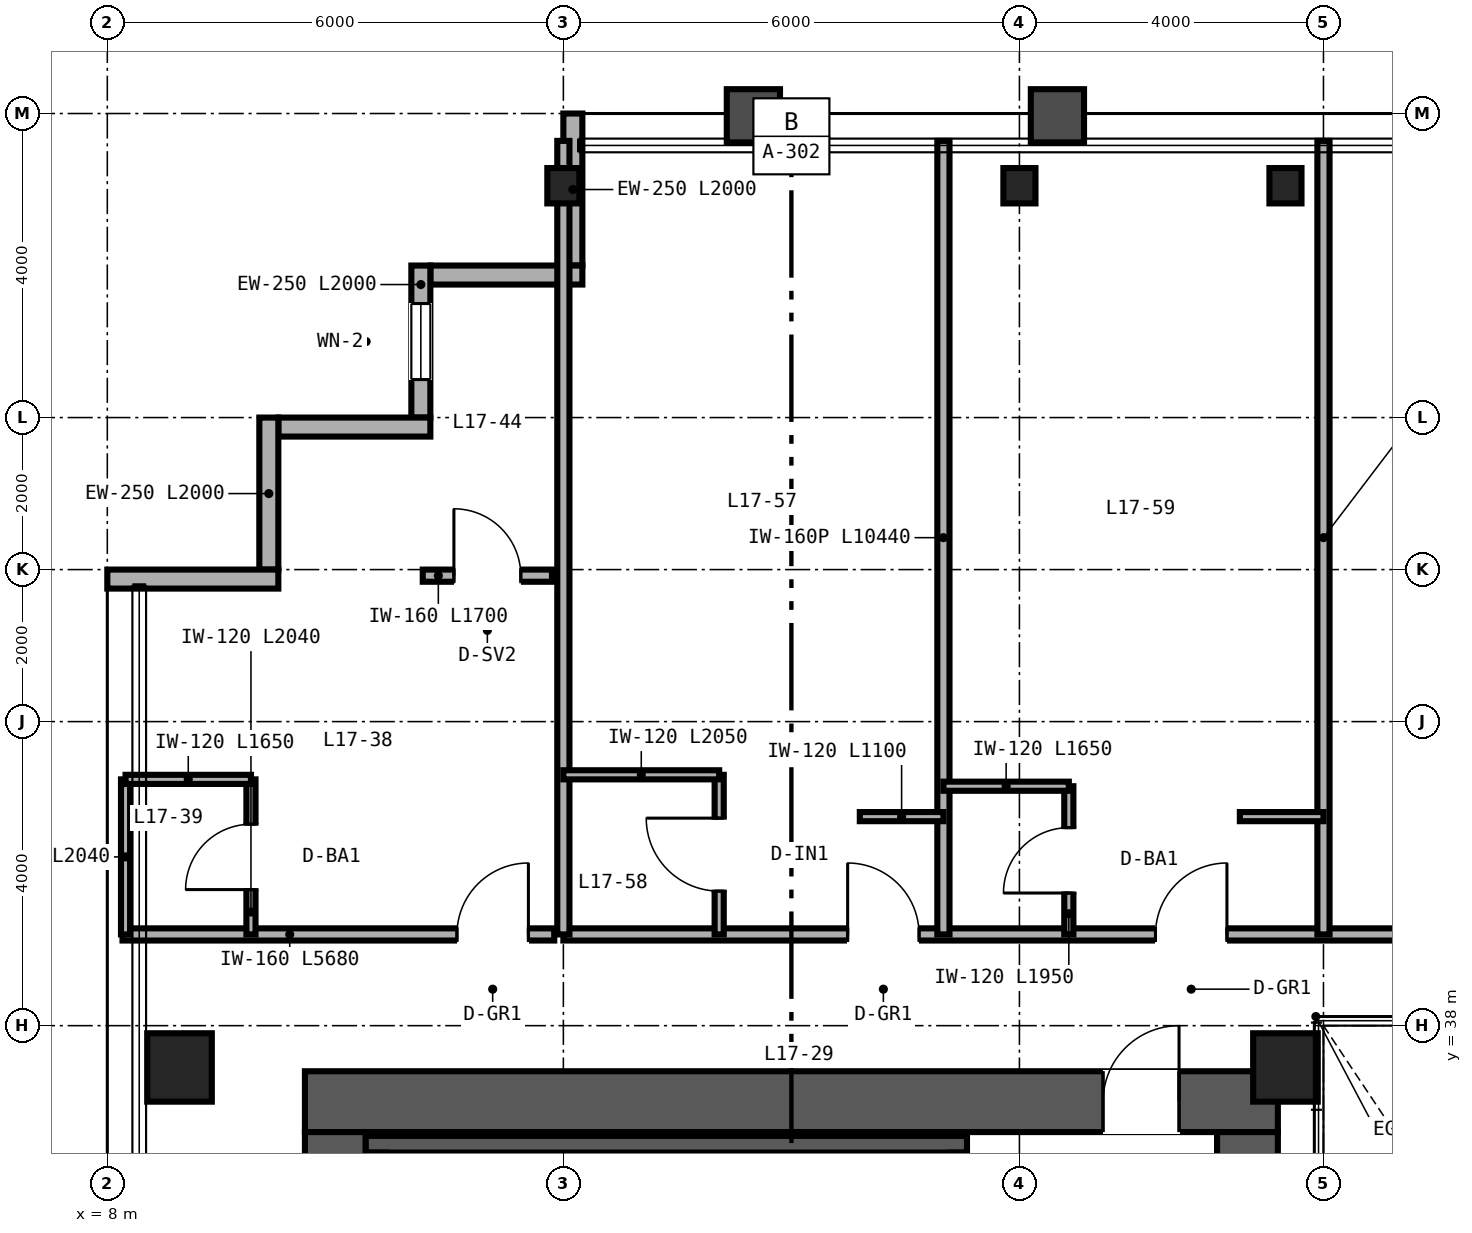
"""IFC4 building model, lengths in metres.
Left out: names, types, materials, properties, quantities, classifications, styles, units other than length and angle.
Written with IfcOpenShell. Run it as: python <this file> out.ifc"""

import sys

from ifc_helpers import new_model, si_unit, direction, frame, frame_2d, origin, origin_2d, place, context, subcontext, project, spatial, rectangle, hollow_rectangle, i_section, extrude, source, transform, mapped, element, fill, save


model = new_model("IFC4")
c1 = context("Model", 3, precision=1e-05, world=origin(), true_north=direction((0.0, 1.0)))
c2 = subcontext(c1, "Body", "Model", "MODEL_VIEW")
j1 = project(units=[si_unit("LENGTHUNIT", "METRE"), si_unit("PLANEANGLEUNIT", "RADIAN")], contexts=[c1])
p1 = place(None, origin())
s1 = spatial("IfcSite", under=j1, at=p1, CompositionType="ELEMENT")
p2 = place(p1, origin())
s2 = spatial("IfcBuilding", under=s1, at=p2, CompositionType="ELEMENT")
p3 = place(p2, frame((0.0, 0.0, 70.8)))
s3 = spatial("IfcBuildingStorey", under=s2, at=p3, CompositionType="ELEMENT", Elevation=70.8)
p4 = place(p3, frame((10.6, 37.0, 0.0), z_axis=(0.0, 0.0, 1.0), x_axis=(1.0, 0.0, 0.0)))
e1 = element("IfcWall", 1, at=p4, inside=s3, PredefinedType="SHEAR", context=c2, shape_type="SweptSolid", body=[
    extrude(rectangle(XDim=12.8, YDim=0.8, at=frame_2d((6.4, 0.0))), origin(), (0.0, 0.0, 1.0), 3.35),
])
p5 = place(p4, frame((10.5, 0.0, 0.0)))
e2 = element("IfcOpeningElement", 2, at=p5, cuts=e1, PredefinedType="OPENING", context=c2, shape_type="SweptSolid", body=[
    extrude(rectangle(XDim=1.0, YDim=2.15, at=frame_2d((0.5, 1.075))), frame((0.0, 0.41, 0.0), z_axis=(0.0, -1.0, 0.0), x_axis=(1.0, 0.0, 0.0)), (0.0, 0.0, 1.0), 0.82),
])
for number, where, z_axis, x_axis in (
    (3, (11.0, 15.4, 0.0), (0.0, 0.0, 1.0), (0.0, 1.0, 0.0)),
    (4, (23.0, 15.4, 0.0), (0.0, 0.0, 1.0), (0.0, 1.0, 0.0)),
):
    element("IfcWall", number, at=place(p3, frame(where, z_axis=z_axis, x_axis=x_axis)), inside=s3, PredefinedType="SHEAR", context=c2, shape_type="SweptSolid", body=[
        extrude(rectangle(XDim=21.2, YDim=0.8, at=frame_2d((10.6, 0.0))), origin(), (0.0, 0.0, 1.0), 3.35),
    ])
p6 = place(p3, frame((11.4, 36.44, 0.0), z_axis=(0.0, 0.0, 1.0), x_axis=(1.0, 0.0, 0.0)))
e5 = element("IfcWall", 5, at=p6, inside=s3, PredefinedType="SHEAR", context=c2, shape_type="SweptSolid", body=[
    extrude(rectangle(XDim=7.91, YDim=0.22, at=frame_2d((3.955, 0.0))), origin(), (0.0, 0.0, 1.0), 3.4),
])
for number, where, z_axis, x_axis in (
    (6, (11.56, 33.05, 0.0), (0.0, 0.0, 1.0), (0.0, 1.0, 0.0)),
    (7, (19.2, 33.05, 0.0), (0.0, 0.0, 1.0), (0.0, 1.0, 0.0)),
):
    element("IfcWall", number, at=place(p3, frame(where, z_axis=z_axis, x_axis=x_axis)), inside=s3, PredefinedType="SHEAR", context=c2, shape_type="SweptSolid", body=[
        extrude(rectangle(XDim=3.28, YDim=0.22, at=frame_2d((1.64, 0.0))), origin(), (0.0, 0.0, 1.0), 3.4),
    ])
m1 = source(origin(), c2, "Body", "SweptSolid", [
    extrude(hollow_rectangle(XDim=0.85, YDim=0.9, WallThickness=0.04, at=origin_2d()), origin(), (0.0, 0.0, 1.0), 3.35),
])
for number, where, z_axis, x_axis in (
    (8, (8.95, 37.45, 0.0), (0.0, 0.0, 1.0), (1.0, 0.0, 0.0)),
    (9, (23.5, 37.45, 0.0), (0.0, 0.0, 1.0), (1.0, 0.0, 0.0)),
):
    element("IfcColumn", number, at=place(p3, frame(where, z_axis=z_axis, x_axis=x_axis)), inside=s3, PredefinedType="COLUMN", context=c2, shape_type="MappedRepresentation", body=[
        mapped(m1, transform((0.0, 0.0, 0.0), scale=1.0)),
    ])
m2 = source(origin(), c2, "Body", "SweptSolid", [
    extrude(i_section(OverallWidth=0.422, OverallDepth=0.465, WebThickness=0.045, FlangeThickness=0.073, FilletRadius=0.025, at=origin_2d()), origin(), (0.0, 0.0, 1.0), 3.35),
])
for number, where, z_axis, x_axis in (
    (10, (14.0, 49.05, 0.0), (0.0, 0.0, 1.0), (1.0, 0.0, 0.0)),
    (11, (20.0, 49.05, 0.0), (0.0, 0.0, 1.0), (1.0, 0.0, 0.0)),
    (12, (23.5, 49.05, 0.0), (0.0, 0.0, 1.0), (1.0, 0.0, 0.0)),
):
    element("IfcColumn", number, at=place(p3, frame(where, z_axis=z_axis, x_axis=x_axis)), inside=s3, PredefinedType="COLUMN", context=c2, shape_type="MappedRepresentation", body=[
        mapped(m2, transform((0.0, 0.0, 0.0), scale=1.0)),
    ])
p7 = place(p3, frame((14.125, 50.0, 0.0), z_axis=(0.0, 0.0, 1.0), x_axis=(0.0, -1.0, 0.0)))
e13 = element("IfcWall", 13, at=p7, inside=s3, PredefinedType="SOLIDWALL", context=c2, shape_type="SweptSolid", body=[
    extrude(rectangle(XDim=2.0, YDim=0.25, at=frame_2d((1.0, 0.0))), origin(), (0.0, 0.0, 1.0), 2.657),
])
p8 = place(p3, frame((14.25, 47.875, 0.0), z_axis=(0.0, 0.0, 1.0), x_axis=(-1.0, 0.0, 0.0)))
e14 = element("IfcWall", 14, at=p8, inside=s3, PredefinedType="SOLIDWALL", context=c2, shape_type="SweptSolid", body=[
    extrude(rectangle(XDim=2.0, YDim=0.25, at=frame_2d((1.0, 0.0))), origin(), (0.0, 0.0, 1.0), 3.35),
])
p9 = place(p3, frame((12.125, 48.0, 0.0), z_axis=(0.0, 0.0, 1.0), x_axis=(0.0, -1.0, 0.0)))
e15 = element("IfcWall", 15, at=p9, inside=s3, PredefinedType="SOLIDWALL", context=c2, shape_type="SweptSolid", body=[
    extrude(rectangle(XDim=2.0, YDim=0.25, at=frame_2d((1.0, 0.0))), origin(), (0.0, 0.0, 1.0), 3.35),
])
p10 = place(p9, frame((0.5, 0.0, 0.85)))
e16 = element("IfcOpeningElement", 16, at=p10, cuts=e15, PredefinedType="OPENING", context=c2, shape_type="SweptSolid", body=[
    extrude(rectangle(XDim=1.0, YDim=1.9, at=frame_2d((0.5, 0.95))), frame((0.0, 0.135, 0.0), z_axis=(0.0, -1.0, 0.0), x_axis=(1.0, 0.0, 0.0)), (0.0, 0.0, 1.0), 0.27),
])
for number, where, z_axis, x_axis in (
    (17, (12.25, 45.875, 0.0), (0.0, 0.0, 1.0), (-1.0, 0.0, 0.0)),
    (18, (10.125, 46.0, 0.0), (0.0, 0.0, 1.0), (0.0, -1.0, 0.0)),
):
    element("IfcWall", number, at=place(p3, frame(where, z_axis=z_axis, x_axis=x_axis)), inside=s3, PredefinedType="SOLIDWALL", context=c2, shape_type="SweptSolid", body=[
        extrude(rectangle(XDim=2.0, YDim=0.25, at=frame_2d((1.0, 0.0))), origin(), (0.0, 0.0, 1.0), 3.35),
    ])
p11 = place(p3, frame((10.25, 43.875, 0.0), z_axis=(0.0, 0.0, 1.0), x_axis=(-1.0, 0.0, 0.0)))
e19 = element("IfcWall", 19, at=p11, inside=s3, PredefinedType="SOLIDWALL", context=c2, shape_type="SweptSolid", body=[
    extrude(rectangle(XDim=2.25, YDim=0.25, at=frame_2d((1.125, 0.0))), origin(), (0.0, 0.0, 1.0), 3.35),
])
p12 = place(p3, frame((8.2, 39.2, 0.0), z_axis=(0.0, 0.0, 1.0), x_axis=(1.0, 0.0, 0.0)))
e20 = element("IfcWall", 20, at=p12, inside=s3, PredefinedType="PARTITIONING", context=c2, shape_type="SweptSolid", body=[
    extrude(rectangle(XDim=5.68, YDim=0.16, at=frame_2d((2.84, 0.0))), origin(), (0.0, 0.0, 1.0), 3.35),
])
p13 = place(p12, frame((4.4, 0.0, 0.0)))
e21 = element("IfcOpeningElement", 21, at=p13, cuts=e20, PredefinedType="OPENING", context=c2, shape_type="SweptSolid", body=[
    extrude(rectangle(XDim=0.94, YDim=2.15, at=frame_2d((0.47, 1.075))), frame((0.0, 0.09, 0.0), z_axis=(0.0, -1.0, 0.0), x_axis=(1.0, 0.0, 0.0)), (0.0, 0.0, 1.0), 0.18),
])
p14 = place(p3, frame((9.89, 39.2, 0.0), z_axis=(0.0, 0.0, 1.0), x_axis=(0.0, 1.0, 0.0)))
e22 = element("IfcWall", 22, at=p14, inside=s3, PredefinedType="PARTITIONING", context=c2, shape_type="SweptSolid", body=[
    extrude(rectangle(XDim=2.04, YDim=0.12, at=frame_2d((1.02, 0.0))), origin(), (0.0, 0.0, 1.0), 3.35),
])
p15 = place(p14, frame((0.59, 0.0, 0.0)))
e23 = element("IfcOpeningElement", 23, at=p15, cuts=e22, PredefinedType="OPENING", context=c2, shape_type="SweptSolid", body=[
    extrude(rectangle(XDim=0.86, YDim=2.1, at=frame_2d((0.43, 1.05))), frame((0.0, 0.07, 0.0), z_axis=(0.0, -1.0, 0.0), x_axis=(1.0, 0.0, 0.0)), (0.0, 0.0, 1.0), 0.14),
])
p16 = place(p3, frame((8.24, 39.2, 0.0), z_axis=(0.0, 0.0, 1.0), x_axis=(0.0, 1.0, 0.0)))
e24 = element("IfcWall", 24, at=p16, inside=s3, PredefinedType="PARTITIONING", context=c2, shape_type="SweptSolid", body=[
    extrude(rectangle(XDim=2.04, YDim=0.12, at=frame_2d((1.02, 0.0))), origin(), (0.0, 0.0, 1.0), 3.35),
])
p17 = place(p3, frame((8.24, 41.24, 0.0), z_axis=(0.0, 0.0, 1.0), x_axis=(1.0, 0.0, 0.0)))
e25 = element("IfcWall", 25, at=p17, inside=s3, PredefinedType="PARTITIONING", context=c2, shape_type="SweptSolid", body=[
    extrude(rectangle(XDim=1.65, YDim=0.12, at=frame_2d((0.825, 0.0))), origin(), (0.0, 0.0, 1.0), 3.35),
])
p18 = place(p3, frame((12.15, 43.92, 0.0), z_axis=(0.0, 0.0, 1.0), x_axis=(1.0, 0.0, 0.0)))
e26 = element("IfcWall", 26, at=p18, inside=s3, PredefinedType="PARTITIONING", context=c2, shape_type="SweptSolid", body=[
    extrude(rectangle(XDim=1.7, YDim=0.16, at=frame_2d((0.85, 0.0))), origin(), (0.0, 0.0, 1.0), 3.35),
])
p19 = place(p18, frame((0.41, 0.0, 0.0)))
e27 = element("IfcOpeningElement", 27, at=p19, cuts=e26, PredefinedType="OPENING", context=c2, shape_type="SweptSolid", body=[
    extrude(rectangle(XDim=0.88, YDim=2.15, at=frame_2d((0.44, 1.075))), frame((0.0, 0.09, 0.0), z_axis=(0.0, -1.0, 0.0), x_axis=(1.0, 0.0, 0.0)), (0.0, 0.0, 1.0), 0.18),
])
p20 = place(p3, frame((14.0, 39.2, 0.0), z_axis=(0.0, 0.0, 1.0), x_axis=(1.0, 0.0, 0.0)))
e28 = element("IfcWall", 28, at=p20, inside=s3, PredefinedType="PARTITIONING", context=c2, shape_type="SweptSolid", body=[
    extrude(rectangle(XDim=36.0, YDim=0.16, at=frame_2d((18.0, 0.0))), origin(), (0.0, 0.0, 1.0), 2.571),
])
p21 = place(p20, frame((3.74, 0.0, 0.0)))
e29 = element("IfcOpeningElement", 29, at=p21, cuts=e28, PredefinedType="OPENING", context=c2, shape_type="SweptSolid", body=[
    extrude(rectangle(XDim=0.94, YDim=2.15, at=frame_2d((0.47, 1.075))), frame((0.0, 0.09, 0.0), z_axis=(0.0, -1.0, 0.0), x_axis=(1.0, 0.0, 0.0)), (0.0, 0.0, 1.0), 0.18),
])
p22 = place(p20, frame((7.79, 0.0, 0.0)))
e30 = element("IfcOpeningElement", 30, at=p22, cuts=e28, PredefinedType="OPENING", context=c2, shape_type="SweptSolid", body=[
    extrude(rectangle(XDim=0.94, YDim=2.15, at=frame_2d((0.47, 1.075))), frame((0.0, 0.09, 0.0), z_axis=(0.0, -1.0, 0.0), x_axis=(1.0, 0.0, 0.0)), (0.0, 0.0, 1.0), 0.18),
])
p23 = place(p20, frame((12.22, 0.0, 0.0)))
e31 = element("IfcOpeningElement", 31, at=p23, cuts=e28, PredefinedType="OPENING", context=c2, shape_type="SweptSolid", body=[
    extrude(rectangle(XDim=0.96, YDim=2.15, at=frame_2d((0.48, 1.075))), frame((0.0, 0.09, 0.0), z_axis=(0.0, -1.0, 0.0), x_axis=(1.0, 0.0, 0.0)), (0.0, 0.0, 1.0), 0.18),
])
p24 = place(p20, frame((19.94, 0.0, 0.0)))
e32 = element("IfcOpeningElement", 32, at=p24, cuts=e28, PredefinedType="OPENING", context=c2, shape_type="SweptSolid", body=[
    extrude(rectangle(XDim=0.94, YDim=2.15, at=frame_2d((0.47, 1.075))), frame((0.0, 0.09, 0.0), z_axis=(0.0, -1.0, 0.0), x_axis=(1.0, 0.0, 0.0)), (0.0, 0.0, 1.0), 0.18),
])
p25 = place(p20, frame((24.84, 0.0, 0.0)))
e33 = element("IfcOpeningElement", 33, at=p25, cuts=e28, PredefinedType="OPENING", context=c2, shape_type="SweptSolid", body=[
    extrude(rectangle(XDim=0.94, YDim=2.15, at=frame_2d((0.47, 1.075))), frame((0.0, 0.09, 0.0), z_axis=(0.0, -1.0, 0.0), x_axis=(1.0, 0.0, 0.0)), (0.0, 0.0, 1.0), 0.18),
])
p26 = place(p20, frame((29.94, 0.0, 0.0)))
e34 = element("IfcOpeningElement", 34, at=p26, cuts=e28, PredefinedType="OPENING", context=c2, shape_type="SweptSolid", body=[
    extrude(rectangle(XDim=0.94, YDim=2.15, at=frame_2d((0.47, 1.075))), frame((0.0, 0.09, 0.0), z_axis=(0.0, -1.0, 0.0), x_axis=(1.0, 0.0, 0.0)), (0.0, 0.0, 1.0), 0.18),
])
p27 = place(p20, frame((33.12, 0.0, 0.0)))
e35 = element("IfcOpeningElement", 35, at=p27, cuts=e28, PredefinedType="OPENING", context=c2, shape_type="SweptSolid", body=[
    extrude(rectangle(XDim=0.96, YDim=2.15, at=frame_2d((0.48, 1.075))), frame((0.0, 0.09, 0.0), z_axis=(0.0, -1.0, 0.0), x_axis=(1.0, 0.0, 0.0)), (0.0, 0.0, 1.0), 0.18),
])
for number, where, z_axis, x_axis in (
    (36, (14.0, 39.2, 0.0), (0.0, 0.0, 1.0), (0.0, 1.0, 0.0)),
    (37, (19.0, 39.2, 0.0), (0.0, 0.0, 1.0), (0.0, 1.0, 0.0)),
):
    element("IfcWall", number, at=place(p3, frame(where, z_axis=z_axis, x_axis=x_axis)), inside=s3, PredefinedType="PARTITIONING", context=c2, shape_type="SweptSolid", body=[
        extrude(rectangle(XDim=10.44, YDim=0.16, at=frame_2d((5.22, 0.0))), origin(), (0.0, 0.0, 1.0), 2.657),
    ])
p28 = place(p3, frame((16.05, 39.2, 0.0), z_axis=(0.0, 0.0, 1.0), x_axis=(0.0, 1.0, 0.0)))
e38 = element("IfcWall", 38, at=p28, inside=s3, PredefinedType="PARTITIONING", context=c2, shape_type="SweptSolid", body=[
    extrude(rectangle(XDim=2.1, YDim=0.12, at=frame_2d((1.05, 0.0))), origin(), (0.0, 0.0, 1.0), 3.35),
])
p29 = place(p28, frame((0.57, 0.0, 0.0)))
e39 = element("IfcOpeningElement", 39, at=p29, cuts=e38, PredefinedType="OPENING", context=c2, shape_type="SweptSolid", body=[
    extrude(rectangle(XDim=0.96, YDim=2.15, at=frame_2d((0.48, 1.075))), frame((0.0, 0.07, 0.0), z_axis=(0.0, -1.0, 0.0), x_axis=(1.0, 0.0, 0.0)), (0.0, 0.0, 1.0), 0.14),
])
p30 = place(p3, frame((14.0, 41.3, 0.0), z_axis=(0.0, 0.0, 1.0), x_axis=(1.0, 0.0, 0.0)))
e40 = element("IfcWall", 40, at=p30, inside=s3, PredefinedType="PARTITIONING", context=c2, shape_type="SweptSolid", body=[
    extrude(rectangle(XDim=2.05, YDim=0.12, at=frame_2d((1.025, 0.0))), origin(), (0.0, 0.0, 1.0), 3.35),
])
p31 = place(p3, frame((17.9, 40.75, 0.0), z_axis=(0.0, 0.0, 1.0), x_axis=(1.0, 0.0, 0.0)))
e41 = element("IfcWall", 41, at=p31, inside=s3, PredefinedType="PARTITIONING", context=c2, shape_type="SweptSolid", body=[
    extrude(rectangle(XDim=1.1, YDim=0.12, at=frame_2d((0.55, 0.0))), origin(), (0.0, 0.0, 1.0), 3.35),
])
p32 = place(p3, frame((24.0, 39.2, 0.0), z_axis=(0.0, 0.0, 1.0), x_axis=(0.0, 1.0, 0.0)))
e42 = element("IfcWall", 42, at=p32, inside=s3, PredefinedType="PARTITIONING", context=c2, shape_type="SweptSolid", body=[
    extrude(rectangle(XDim=10.44, YDim=0.16, at=frame_2d((5.22, 0.0))), origin(), (0.0, 0.0, 1.0), 2.423),
])
p33 = place(p3, frame((20.65, 39.2, 0.0), z_axis=(0.0, 0.0, 1.0), x_axis=(0.0, 1.0, 0.0)))
e43 = element("IfcWall", 43, at=p33, inside=s3, PredefinedType="PARTITIONING", context=c2, shape_type="SweptSolid", body=[
    extrude(rectangle(XDim=1.95, YDim=0.12, at=frame_2d((0.975, 0.0))), origin(), (0.0, 0.0, 1.0), 3.35),
])
p34 = place(p33, frame((0.545, 0.0, 0.0)))
e44 = element("IfcOpeningElement", 44, at=p34, cuts=e43, PredefinedType="OPENING", context=c2, shape_type="SweptSolid", body=[
    extrude(rectangle(XDim=0.86, YDim=2.1, at=frame_2d((0.43, 1.05))), frame((0.0, 0.07, 0.0), z_axis=(0.0, -1.0, 0.0), x_axis=(1.0, 0.0, 0.0)), (0.0, 0.0, 1.0), 0.14),
])
p35 = place(p3, frame((19.0, 41.15, 0.0), z_axis=(0.0, 0.0, 1.0), x_axis=(1.0, 0.0, 0.0)))
e45 = element("IfcWall", 45, at=p35, inside=s3, PredefinedType="PARTITIONING", context=c2, shape_type="SweptSolid", body=[
    extrude(rectangle(XDim=1.65, YDim=0.12, at=frame_2d((0.825, 0.0))), origin(), (0.0, 0.0, 1.0), 3.35),
])
p36 = place(p3, frame((22.9, 40.75, 0.0), z_axis=(0.0, 0.0, 1.0), x_axis=(1.0, 0.0, 0.0)))
e46 = element("IfcWall", 46, at=p36, inside=s3, PredefinedType="PARTITIONING", context=c2, shape_type="SweptSolid", body=[
    extrude(rectangle(XDim=1.1, YDim=0.12, at=frame_2d((0.55, 0.0))), origin(), (0.0, 0.0, 1.0), 2.571),
])
m3 = source(origin(), c2, "Body", "SweptSolid", [
    extrude(rectangle(XDim=1.0, YDim=1.9, at=frame_2d((0.5, 0.95))), frame((0.0, 0.03, 0.0), z_axis=(0.0, -1.0, 0.0), x_axis=(1.0, 0.0, 0.0)), (0.0, 0.0, 1.0), 0.06),
])
p37 = place(p10, origin())
e47 = element("IfcWindow", 47, at=p37, inside=s3, PartitioningType="SINGLE_PANEL", PredefinedType="WINDOW", context=c2, shape_type="MappedRepresentation", body=[
    mapped(m3, transform((0.0, 0.0, 0.0), scale=1.0)),
])
fill(e16, e47)
m4 = source(origin(), c2, "Body", "SweptSolid", [
    extrude(rectangle(XDim=1.0, YDim=2.15, at=frame_2d((0.5, 1.075))), frame((0.0, 0.025, 0.0), z_axis=(0.0, -1.0, 0.0), x_axis=(1.0, 0.0, 0.0)), (0.0, 0.0, 1.0), 0.05),
])
p38 = place(p5, origin())
e48 = element("IfcDoor", 48, at=p38, inside=s3, OperationType="SINGLE_SWING_RIGHT", PredefinedType="DOOR", context=c2, shape_type="MappedRepresentation", body=[
    mapped(m4, transform((0.0, 0.0, 0.0), scale=1.0)),
])
fill(e2, e48)
m5 = source(origin(), c2, "Body", "SweptSolid", [
    extrude(rectangle(XDim=0.86, YDim=2.1, at=frame_2d((0.43, 1.05))), frame((0.0, 0.025, 0.0), z_axis=(0.0, -1.0, 0.0), x_axis=(1.0, 0.0, 0.0)), (0.0, 0.0, 1.0), 0.05),
])
p39 = place(p15, origin())
e49 = element("IfcDoor", 49, at=p39, inside=s3, OperationType="SINGLE_SWING_LEFT", PredefinedType="DOOR", context=c2, shape_type="MappedRepresentation", body=[
    mapped(m5, transform((0.0, 0.0, 0.0), scale=1.0)),
])
fill(e23, e49)
m6 = source(origin(), c2, "Body", "SweptSolid", [
    extrude(rectangle(XDim=0.94, YDim=2.15, at=frame_2d((0.47, 1.075))), frame((0.0, 0.025, 0.0), z_axis=(0.0, -1.0, 0.0), x_axis=(1.0, 0.0, 0.0)), (0.0, 0.0, 1.0), 0.05),
])
p40 = place(p13, origin())
e50 = element("IfcDoor", 50, at=p40, inside=s3, OperationType="SINGLE_SWING_RIGHT", PredefinedType="DOOR", context=c2, shape_type="MappedRepresentation", body=[
    mapped(m6, transform((0.0, 0.0, 0.0), scale=1.0)),
])
fill(e21, e50)
m7 = source(origin(), c2, "Body", "SweptSolid", [
    extrude(rectangle(XDim=0.88, YDim=2.15, at=frame_2d((0.44, 1.075))), frame((0.0, 0.025, 0.0), z_axis=(0.0, -1.0, 0.0), x_axis=(1.0, 0.0, 0.0)), (0.0, 0.0, 1.0), 0.05),
])
p41 = place(p19, origin())
e51 = element("IfcDoor", 51, at=p41, inside=s3, OperationType="SINGLE_SWING_LEFT", PredefinedType="DOOR", context=c2, shape_type="MappedRepresentation", body=[
    mapped(m7, transform((0.0, 0.0, 0.0), scale=1.0)),
])
fill(e27, e51)
m8 = source(origin(), c2, "Body", "SweptSolid", [
    extrude(rectangle(XDim=0.96, YDim=2.15, at=frame_2d((0.48, 1.075))), frame((0.0, 0.025, 0.0), z_axis=(0.0, -1.0, 0.0), x_axis=(1.0, 0.0, 0.0)), (0.0, 0.0, 1.0), 0.05),
])
p42 = place(p29, origin())
e52 = element("IfcDoor", 52, at=p42, inside=s3, OperationType="SINGLE_SWING_RIGHT", PredefinedType="DOOR", context=c2, shape_type="MappedRepresentation", body=[
    mapped(m8, transform((0.0, 0.0, 0.0), scale=1.0)),
])
fill(e39, e52)
p43 = place(p34, origin())
e53 = element("IfcDoor", 53, at=p43, inside=s3, OperationType="SINGLE_SWING_LEFT", PredefinedType="DOOR", context=c2, shape_type="MappedRepresentation", body=[
    mapped(m5, transform((0.0, 0.0, 0.0), scale=1.0)),
])
fill(e44, e53)
p44 = place(p21, origin())
e54 = element("IfcDoor", 54, at=p44, inside=s3, OperationType="SINGLE_SWING_LEFT", PredefinedType="DOOR", context=c2, shape_type="MappedRepresentation", body=[
    mapped(m6, transform((0.0, 0.0, 0.0), scale=1.0)),
])
fill(e29, e54)
p45 = place(p22, origin())
e55 = element("IfcDoor", 55, at=p45, inside=s3, OperationType="SINGLE_SWING_RIGHT", PredefinedType="DOOR", context=c2, shape_type="MappedRepresentation", body=[
    mapped(m6, transform((0.0, 0.0, 0.0), scale=1.0)),
])
fill(e30, e55)
save(model, sys.argv[1])
